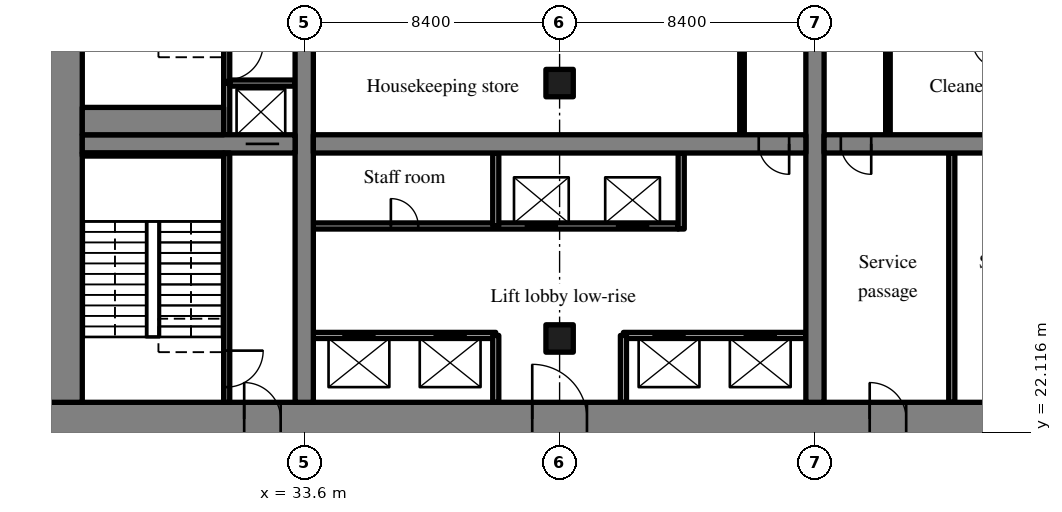
"""IFC4 building model, lengths in metres.
Left out: names, types, materials, properties, quantities, classifications, styles, units other than length and angle.
Written with IfcOpenShell. Run it as: python <this file> out.ifc"""

import sys

from ifc_helpers import new_model, si_unit, direction, frame, frame_2d, origin, origin_2d, place, context, subcontext, project, spatial, rectangle, extrude, source, transform, mapped, element, fill, save


model = new_model("IFC4")
c1 = context("Model", 3, precision=1e-05, world=origin(), true_north=direction((0.0, 1.0)))
c2 = subcontext(c1, "Body", "Model", "MODEL_VIEW")
j1 = project(units=[si_unit("LENGTHUNIT", "METRE"), si_unit("PLANEANGLEUNIT", "RADIAN")], contexts=[c1])
p1 = place(None, origin())
s1 = spatial("IfcSite", under=j1, at=p1, CompositionType="ELEMENT")
p2 = place(p1, origin())
s2 = spatial("IfcBuilding", under=s1, at=p2, CompositionType="ELEMENT")
p3 = place(p2, frame((0.0, 0.0, -13.5)))
s3 = spatial("IfcBuildingStorey", under=s2, at=p3, CompositionType="ELEMENT", Elevation=-13.5)
m1 = source(origin(), c2, "Body", "SweptSolid", [
    extrude(rectangle(XDim=50.4, YDim=1.1, at=frame_2d((25.2, 0.0))), origin(), (0.0, 0.0, 1.0), 4.52),
])
p4 = place(p3, frame((25.2, 22.55, -0.3), z_axis=(0.0, 0.0, 1.0), x_axis=(1.0, 0.0, 0.0)))
e1 = element("IfcWall", 1, at=p4, inside=s3, PredefinedType="SHEAR", context=c2, shape_type="MappedRepresentation", body=[
    mapped(m1, transform((0.0, 0.0, 0.0), scale=1.0)),
])
m2 = source(origin(), c2, "Body", "SweptSolid", [
    extrude(rectangle(XDim=1.8, YDim=2.1, at=frame_2d((0.9, 1.05))), frame((0.0, 0.56, 0.0), z_axis=(0.0, -1.0, 0.0), x_axis=(1.0, 0.0, 0.0)), (0.0, 0.0, 1.0), 1.12),
])
p5 = place(p4, frame((15.9, 0.0, 0.0)))
e2 = element("IfcOpeningElement", 2, at=p5, cuts=e1, PredefinedType="OPENING", context=c2, shape_type="MappedRepresentation", body=[
    mapped(m2, transform((0.0, 0.0, 0.0), scale=1.0)),
])
m3 = source(origin(), c2, "Body", "SweptSolid", [
    extrude(rectangle(XDim=1.2, YDim=2.1, at=frame_2d((0.6, 1.05))), frame((0.0, 0.56, 0.0), z_axis=(0.0, -1.0, 0.0), x_axis=(1.0, 0.0, 0.0)), (0.0, 0.0, 1.0), 1.12),
])
p6 = place(p4, frame((27.0, 0.0, 0.0)))
e3 = element("IfcOpeningElement", 3, at=p6, cuts=e1, PredefinedType="OPENING", context=c2, shape_type="MappedRepresentation", body=[
    mapped(m3, transform((0.0, 0.0, 0.0), scale=1.0)),
])
m4 = source(origin(), c2, "Body", "SweptSolid", [
    extrude(rectangle(XDim=0.9, YDim=2.1, at=frame_2d((0.45, 1.05))), frame((0.0, 0.56, 0.0), z_axis=(0.0, -1.0, 0.0), x_axis=(1.0, 0.0, 0.0)), (0.0, 0.0, 1.0), 1.12),
])
p7 = place(p4, frame((33.75, 0.0, 0.0)))
e4 = element("IfcOpeningElement", 4, at=p7, cuts=e1, PredefinedType="OPENING", context=c2, shape_type="MappedRepresentation", body=[
    mapped(m4, transform((0.0, 0.0, 0.0), scale=1.0)),
])
p8 = place(p4, frame((30.75, 0.0, 0.0)))
e5 = element("IfcOpeningElement", 5, at=p8, cuts=e1, PredefinedType="OPENING", context=c2, shape_type="MappedRepresentation", body=[
    mapped(m4, transform((0.0, 0.0, 0.0), scale=1.0)),
])
p9 = place(p4, frame((38.25, 0.0, 0.0)))
e6 = element("IfcOpeningElement", 6, at=p9, cuts=e1, PredefinedType="OPENING", context=c2, shape_type="MappedRepresentation", body=[
    mapped(m4, transform((0.0, 0.0, 0.0), scale=1.0)),
])
p10 = place(p4, frame((6.425, 0.0, 0.0)))
e7 = element("IfcOpeningElement", 7, at=p10, cuts=e1, PredefinedType="OPENING", context=c2, shape_type="MappedRepresentation", body=[
    mapped(m3, transform((0.0, 0.0, 0.0), scale=1.0)),
])
p11 = place(p4, frame((47.675, 0.0, 0.0)))
e8 = element("IfcOpeningElement", 8, at=p11, cuts=e1, PredefinedType="OPENING", context=c2, shape_type="MappedRepresentation", body=[
    mapped(m3, transform((0.0, 0.0, 0.0), scale=1.0)),
])
m5 = source(origin(), c2, "Body", "SweptSolid", [
    extrude(rectangle(XDim=17.8, YDim=1.1, at=frame_2d((8.9, 0.0))), origin(), (0.0, 0.0, 1.0), 4.52),
])
p12 = place(p3, frame((25.75, 23.1, -0.3), z_axis=(0.0, 0.0, 1.0), x_axis=(0.0, 1.0, 0.0)))
e9 = element("IfcWall", 9, at=p12, inside=s3, PredefinedType="SHEAR", context=c2, shape_type="MappedRepresentation", body=[
    mapped(m5, transform((0.0, 0.0, 0.0), scale=1.0)),
])
m6 = source(origin(), c2, "Body", "SweptSolid", [
    extrude(rectangle(XDim=17.8, YDim=0.6, at=frame_2d((8.9, 0.0))), origin(), (0.0, 0.0, 1.0), 4.52),
])
p13 = place(p3, frame((33.6, 23.1, -0.3), z_axis=(0.0, 0.0, 1.0), x_axis=(0.0, 1.0, 0.0)))
e10 = element("IfcWall", 10, at=p13, inside=s3, PredefinedType="SHEAR", context=c2, shape_type="MappedRepresentation", body=[
    mapped(m6, transform((0.0, 0.0, 0.0), scale=1.0)),
])
m7 = source(origin(), c2, "Body", "SweptSolid", [
    extrude(rectangle(XDim=1.1, YDim=2.1, at=frame_2d((0.55, 1.05))), frame((0.0, 0.31, 0.0), z_axis=(0.0, -1.0, 0.0), x_axis=(1.0, 0.0, 0.0)), (0.0, 0.0, 1.0), 0.62),
])
p14 = place(p13, frame((12.35, 0.0, 0.0)))
e11 = element("IfcOpeningElement", 11, at=p14, cuts=e10, PredefinedType="OPENING", context=c2, shape_type="MappedRepresentation", body=[
    mapped(m7, transform((0.0, 0.0, 0.0), scale=1.0)),
])
p15 = place(p3, frame((50.4, 23.1, -0.3), z_axis=(0.0, 0.0, 1.0), x_axis=(0.0, 1.0, 0.0)))
e12 = element("IfcWall", 12, at=p15, inside=s3, PredefinedType="SHEAR", context=c2, shape_type="MappedRepresentation", body=[
    mapped(m6, transform((0.0, 0.0, 0.0), scale=1.0)),
])
p16 = place(p15, frame((12.35, 0.0, 0.0)))
e13 = element("IfcOpeningElement", 13, at=p16, cuts=e12, PredefinedType="OPENING", context=c2, shape_type="MappedRepresentation", body=[
    mapped(m7, transform((0.0, 0.0, 0.0), scale=1.0)),
])
m8 = source(origin(), c2, "Body", "SweptSolid", [
    extrude(rectangle(XDim=7.0, YDim=0.6, at=frame_2d((3.5, 0.0))), origin(), (0.0, 0.0, 1.0), 4.52),
])
p17 = place(p3, frame((26.3, 31.6, -0.3), z_axis=(0.0, 0.0, 1.0), x_axis=(1.0, 0.0, 0.0)))
e14 = element("IfcWall", 14, at=p17, inside=s3, PredefinedType="SHEAR", context=c2, shape_type="MappedRepresentation", body=[
    mapped(m8, transform((0.0, 0.0, 0.0), scale=1.0)),
])
p18 = place(p17, frame((5.375, 0.0, 0.0)))
e15 = element("IfcOpeningElement", 15, at=p18, cuts=e14, PredefinedType="OPENING", context=c2, shape_type="MappedRepresentation", body=[
    mapped(m7, transform((0.0, 0.0, 0.0), scale=1.0)),
])
m9 = source(origin(), c2, "Body", "SweptSolid", [
    extrude(rectangle(XDim=16.2, YDim=0.6, at=frame_2d((8.1, 0.0))), origin(), (0.0, 0.0, 1.0), 4.52),
])
p19 = place(p3, frame((33.9, 31.6, -0.3), z_axis=(0.0, 0.0, 1.0), x_axis=(1.0, 0.0, 0.0)))
e16 = element("IfcWall", 16, at=p19, inside=s3, PredefinedType="SHEAR", context=c2, shape_type="MappedRepresentation", body=[
    mapped(m9, transform((0.0, 0.0, 0.0), scale=1.0)),
])
m10 = source(origin(), c2, "Body", "SweptSolid", [
    extrude(rectangle(XDim=1.0, YDim=2.1, at=frame_2d((0.5, 1.05))), frame((0.0, 0.31, 0.0), z_axis=(0.0, -1.0, 0.0), x_axis=(1.0, 0.0, 0.0)), (0.0, 0.0, 1.0), 0.62),
])
p20 = place(p19, frame((14.65, 0.0, 0.0)))
e17 = element("IfcOpeningElement", 17, at=p20, cuts=e16, PredefinedType="OPENING", context=c2, shape_type="MappedRepresentation", body=[
    mapped(m10, transform((0.0, 0.0, 0.0), scale=1.0)),
])
m11 = source(origin(), c2, "Body", "SweptSolid", [
    extrude(rectangle(XDim=16.2, YDim=0.6, at=frame_2d((8.1, 0.0))), origin(), (0.0, 0.0, 1.0), 4.52),
])
p21 = place(p3, frame((50.7, 31.6, -0.3), z_axis=(0.0, 0.0, 1.0), x_axis=(1.0, 0.0, 0.0)))
e18 = element("IfcWall", 18, at=p21, inside=s3, PredefinedType="SHEAR", context=c2, shape_type="MappedRepresentation", body=[
    mapped(m11, transform((0.0, 0.0, 0.0), scale=1.0)),
])
p22 = place(p21, frame((0.55, 0.0, 0.0)))
e19 = element("IfcOpeningElement", 19, at=p22, cuts=e18, PredefinedType="OPENING", context=c2, shape_type="MappedRepresentation", body=[
    mapped(m10, transform((0.0, 0.0, 0.0), scale=1.0)),
])
m12 = source(origin(), c2, "Body", "SweptSolid", [
    extrude(rectangle(XDim=0.9, YDim=0.9, at=origin_2d()), origin(), (0.0, 0.0, 1.0), 4.52),
])
for number, where, z_axis, x_axis in (
    (20, (42.0, 25.2, -0.3), (0.0, 0.0, 1.0), (1.0, 0.0, 0.0)),
    (21, (42.0, 33.6, -0.3), (0.0, 0.0, 1.0), (1.0, 0.0, 0.0)),
):
    element("IfcColumn", number, at=place(p3, frame(where, z_axis=z_axis, x_axis=x_axis)), inside=s3, PredefinedType="COLUMN", context=c2, shape_type="MappedRepresentation", body=[
        mapped(m12, transform((0.0, 0.0, 0.0), scale=1.0)),
    ])
m13 = source(origin(), c2, "Body", "SweptSolid", [
    extrude(rectangle(XDim=6.0, YDim=0.2, at=frame_2d((3.0, 0.0))), origin(), (0.0, 0.0, 1.0), 4.22),
])
p23 = place(p3, frame((33.9, 25.3, 0.0), z_axis=(0.0, 0.0, 1.0), x_axis=(1.0, 0.0, 0.0)))
e22 = element("IfcWall", 22, at=p23, inside=s3, PredefinedType="SOLIDWALL", context=c2, shape_type="MappedRepresentation", body=[
    mapped(m13, transform((0.0, 0.0, 0.0), scale=1.0)),
])
m14 = source(origin(), c2, "Body", "SweptSolid", [
    extrude(rectangle(XDim=1.1, YDim=2.1, at=frame_2d((0.55, 1.05))), frame((0.0, 0.11, 0.0), z_axis=(0.0, -1.0, 0.0), x_axis=(1.0, 0.0, 0.0)), (0.0, 0.0, 1.0), 0.22),
])
p24 = place(p23, frame((0.95, 0.0, 0.0)))
e23 = element("IfcOpeningElement", 23, at=p24, cuts=e22, PredefinedType="OPENING", context=c2, shape_type="MappedRepresentation", body=[
    mapped(m14, transform((0.0, 0.0, 0.0), scale=1.0)),
])
p25 = place(p23, frame((3.95, 0.0, 0.0)))
e24 = element("IfcOpeningElement", 24, at=p25, cuts=e22, PredefinedType="OPENING", context=c2, shape_type="MappedRepresentation", body=[
    mapped(m14, transform((0.0, 0.0, 0.0), scale=1.0)),
])
p26 = place(p3, frame((44.1, 25.3, 0.0), z_axis=(0.0, 0.0, 1.0), x_axis=(1.0, 0.0, 0.0)))
e25 = element("IfcWall", 25, at=p26, inside=s3, PredefinedType="SOLIDWALL", context=c2, shape_type="MappedRepresentation", body=[
    mapped(m13, transform((0.0, 0.0, 0.0), scale=1.0)),
])
p27 = place(p26, frame((0.95, 0.0, 0.0)))
e26 = element("IfcOpeningElement", 26, at=p27, cuts=e25, PredefinedType="OPENING", context=c2, shape_type="MappedRepresentation", body=[
    mapped(m14, transform((0.0, 0.0, 0.0), scale=1.0)),
])
p28 = place(p26, frame((3.95, 0.0, 0.0)))
e27 = element("IfcOpeningElement", 27, at=p28, cuts=e25, PredefinedType="OPENING", context=c2, shape_type="MappedRepresentation", body=[
    mapped(m14, transform((0.0, 0.0, 0.0), scale=1.0)),
])
m15 = source(origin(), c2, "Body", "SweptSolid", [
    extrude(rectangle(XDim=12.0, YDim=0.2, at=frame_2d((6.0, 0.0))), origin(), (0.0, 0.0, 1.0), 4.22),
])
p29 = place(p3, frame((33.9, 28.9, 0.0), z_axis=(0.0, 0.0, 1.0), x_axis=(1.0, 0.0, 0.0)))
e28 = element("IfcWall", 28, at=p29, inside=s3, PredefinedType="SOLIDWALL", context=c2, shape_type="MappedRepresentation", body=[
    mapped(m15, transform((0.0, 0.0, 0.0), scale=1.0)),
])
p30 = place(p29, frame((6.95, 0.0, 0.0)))
e29 = element("IfcOpeningElement", 29, at=p30, cuts=e28, PredefinedType="OPENING", context=c2, shape_type="MappedRepresentation", body=[
    mapped(m14, transform((0.0, 0.0, 0.0), scale=1.0)),
])
p31 = place(p29, frame((9.95, 0.0, 0.0)))
e30 = element("IfcOpeningElement", 30, at=p31, cuts=e28, PredefinedType="OPENING", context=c2, shape_type="MappedRepresentation", body=[
    mapped(m14, transform((0.0, 0.0, 0.0), scale=1.0)),
])
m16 = source(origin(), c2, "Body", "SweptSolid", [
    extrude(rectangle(XDim=0.9, YDim=2.1, at=frame_2d((0.45, 1.05))), frame((0.0, 0.11, 0.0), z_axis=(0.0, -1.0, 0.0), x_axis=(1.0, 0.0, 0.0)), (0.0, 0.0, 1.0), 0.22),
])
p32 = place(p29, frame((2.55, 0.0, 0.0)))
e31 = element("IfcOpeningElement", 31, at=p32, cuts=e28, PredefinedType="OPENING", context=c2, shape_type="MappedRepresentation", body=[
    mapped(m16, transform((0.0, 0.0, 0.0), scale=1.0)),
])
m17 = source(origin(), c2, "Body", "SweptSolid", [
    extrude(rectangle(XDim=2.2, YDim=0.2, at=frame_2d((1.1, 0.0))), origin(), (0.0, 0.0, 1.0), 4.22),
])
for number, where, z_axis, x_axis in (
    (32, (39.9, 23.1, 0.0), (0.0, 0.0, 1.0), (0.0, 1.0, 0.0)),
    (33, (44.1, 23.1, 0.0), (0.0, 0.0, 1.0), (0.0, 1.0, 0.0)),
):
    element("IfcWall", number, at=place(p3, frame(where, z_axis=z_axis, x_axis=x_axis)), inside=s3, PredefinedType="SOLIDWALL", context=c2, shape_type="MappedRepresentation", body=[
        mapped(m17, transform((0.0, 0.0, 0.0), scale=1.0)),
    ])
m18 = source(origin(), c2, "Body", "SweptSolid", [
    extrude(rectangle(XDim=2.5, YDim=0.2, at=frame_2d((1.25, 0.0))), origin(), (0.0, 0.0, 1.0), 4.22),
])
p33 = place(p3, frame((46.0, 28.8, 0.0), z_axis=(0.0, 0.0, 1.0), x_axis=(0.0, 1.0, 0.0)))
e34 = element("IfcWall", 34, at=p33, inside=s3, PredefinedType="SOLIDWALL", context=c2, shape_type="MappedRepresentation", body=[
    mapped(m18, transform((0.0, 0.0, 0.0), scale=1.0)),
])
m19 = source(origin(), c2, "Body", "SweptSolid", [
    extrude(rectangle(XDim=2.4, YDim=0.2, at=frame_2d((1.2, 0.0))), origin(), (0.0, 0.0, 1.0), 4.22),
])
p34 = place(p3, frame((39.9, 28.9, 0.0), z_axis=(0.0, 0.0, 1.0), x_axis=(0.0, 1.0, 0.0)))
e35 = element("IfcWall", 35, at=p34, inside=s3, PredefinedType="PARTITIONING", context=c2, shape_type="MappedRepresentation", body=[
    mapped(m19, transform((0.0, 0.0, 0.0), scale=1.0)),
])
m20 = source(origin(), c2, "Body", "SweptSolid", [
    extrude(rectangle(XDim=3.1, YDim=0.15, at=frame_2d((1.55, 0.0))), origin(), (0.0, 0.0, 1.0), 4.22),
])
p35 = place(p3, frame((48.0, 31.9, 0.0), z_axis=(0.0, 0.0, 1.0), x_axis=(0.0, 1.0, 0.0)))
e36 = element("IfcWall", 36, at=p35, inside=s3, PredefinedType="PARTITIONING", context=c2, shape_type="MappedRepresentation", body=[
    mapped(m20, transform((0.0, 0.0, 0.0), scale=1.0)),
])
m21 = source(origin(), c2, "Body", "SweptSolid", [
    extrude(rectangle(XDim=8.2, YDim=0.2, at=frame_2d((4.1, 0.0))), origin(), (0.0, 0.0, 1.0), 4.22),
])
p36 = place(p3, frame((54.9, 23.1, 0.0), z_axis=(0.0, 0.0, 1.0), x_axis=(0.0, 1.0, 0.0)))
e37 = element("IfcWall", 37, at=p36, inside=s3, PredefinedType="PARTITIONING", context=c2, shape_type="MappedRepresentation", body=[
    mapped(m21, transform((0.0, 0.0, 0.0), scale=1.0)),
])
p37 = place(p3, frame((52.8, 31.9, 0.0), z_axis=(0.0, 0.0, 1.0), x_axis=(0.0, 1.0, 0.0)))
e38 = element("IfcWall", 38, at=p37, inside=s3, PredefinedType="PARTITIONING", context=c2, shape_type="MappedRepresentation", body=[
    mapped(m20, transform((0.0, 0.0, 0.0), scale=1.0)),
])
m22 = source(origin(), c2, "Body", "SweptSolid", [
    extrude(rectangle(XDim=8.2, YDim=0.2, at=frame_2d((4.1, 0.0))), origin(), (0.0, 0.0, 1.0), 4.52),
])
p38 = place(p3, frame((31.05, 23.1, -0.3), z_axis=(0.0, 0.0, 1.0), x_axis=(0.0, 1.0, 0.0)))
e39 = element("IfcWall", 39, at=p38, inside=s3, PredefinedType="SOLIDWALL", context=c2, shape_type="MappedRepresentation", body=[
    mapped(m22, transform((0.0, 0.0, 0.0), scale=1.0)),
])
m23 = source(origin(), c2, "Body", "SweptSolid", [
    extrude(rectangle(XDim=1.2, YDim=2.1, at=frame_2d((0.6, 1.05))), frame((0.0, 0.11, 0.0), z_axis=(0.0, -1.0, 0.0), x_axis=(1.0, 0.0, 0.0)), (0.0, 0.0, 1.0), 0.22),
])
p39 = place(p38, frame((0.5, 0.0, 0.0)))
e40 = element("IfcOpeningElement", 40, at=p39, cuts=e39, PredefinedType="OPENING", context=c2, shape_type="MappedRepresentation", body=[
    mapped(m23, transform((0.0, 0.0, 0.0), scale=1.0)),
])
m24 = source(origin(), c2, "Body", "SweptSolid", [
    extrude(rectangle(XDim=1.7, YDim=0.2, at=frame_2d((0.85, 0.0))), origin(), (0.0, 0.0, 1.0), 4.22),
])
p40 = place(p3, frame((31.05, 31.9, 0.0), z_axis=(0.0, 0.0, 1.0), x_axis=(0.0, 1.0, 0.0)))
e41 = element("IfcWall", 41, at=p40, inside=s3, PredefinedType="SOLIDWALL", context=c2, shape_type="MappedRepresentation", body=[
    mapped(m24, transform((0.0, 0.0, 0.0), scale=1.0)),
])
m25 = source(origin(), c2, "Body", "SweptSolid", [
    extrude(rectangle(XDim=2.15, YDim=0.2, at=frame_2d((1.075, 0.0))), origin(), (0.0, 0.0, 1.0), 4.22),
])
p41 = place(p3, frame((31.15, 33.6, 0.0), z_axis=(0.0, 0.0, 1.0), x_axis=(1.0, 0.0, 0.0)))
e42 = element("IfcWall", 42, at=p41, inside=s3, PredefinedType="SOLIDWALL", context=c2, shape_type="MappedRepresentation", body=[
    mapped(m25, transform((0.0, 0.0, 0.0), scale=1.0)),
])
m26 = source(origin(), c2, "Body", "SweptSolid", [
    extrude(rectangle(XDim=7.3, YDim=0.2, at=frame_2d((3.65, 0.0))), origin(), (0.0, 0.0, 1.0), 4.52),
])
p42 = place(p3, frame((31.05, 33.6, -0.3), z_axis=(0.0, 0.0, 1.0), x_axis=(0.0, 1.0, 0.0)))
e43 = element("IfcWall", 43, at=p42, inside=s3, PredefinedType="SOLIDWALL", context=c2, shape_type="MappedRepresentation", body=[
    mapped(m26, transform((0.0, 0.0, 0.0), scale=1.0)),
])
p43 = place(p42, frame((0.1, 0.0, 0.0)))
e44 = element("IfcOpeningElement", 44, at=p43, cuts=e43, PredefinedType="OPENING", context=c2, shape_type="MappedRepresentation", body=[
    mapped(m23, transform((0.0, 0.0, 0.0), scale=1.0)),
])
m27 = source(origin(), c2, "Body", "SweptSolid", [
    extrude(rectangle(XDim=4.65, YDim=0.1, at=frame_2d((2.325, 0.0))), origin(), (0.0, 0.0, 1.0), 4.52),
])
p44 = place(p3, frame((26.3, 31.25, -0.3), z_axis=(0.0, 0.0, 1.0), x_axis=(1.0, 0.0, 0.0)))
e45 = element("IfcWall", 45, at=p44, inside=s3, PredefinedType="SOLIDWALL", context=c2, shape_type="MappedRepresentation", body=[
    mapped(m27, transform((0.0, 0.0, 0.0), scale=1.0)),
])
m28 = source(origin(), c2, "Body", "SweptSolid", [
    extrude(rectangle(XDim=4.65, YDim=0.9, at=frame_2d((2.325, 0.0))), origin(), (0.0, 0.0, 1.0), 4.52),
])
p45 = place(p3, frame((26.3, 32.35, -0.3), z_axis=(0.0, 0.0, 1.0), x_axis=(1.0, 0.0, 0.0)))
e46 = element("IfcWall", 46, at=p45, inside=s3, PredefinedType="SOLIDWALL", context=c2, shape_type="MappedRepresentation", body=[
    mapped(m28, transform((0.0, 0.0, 0.0), scale=1.0)),
])
m29 = source(origin(), c2, "Body", "SweptSolid", [
    extrude(rectangle(XDim=1.8, YDim=2.1, at=frame_2d((0.9, 1.05))), frame((0.0, 0.325, 0.0), z_axis=(0.0, -1.0, 0.0), x_axis=(1.0, 0.0, 0.0)), (0.0, 0.0, 1.0), 0.05),
])
p46 = place(p5, origin())
e47 = element("IfcDoor", 47, at=p46, inside=s3, OperationType="DOUBLE_DOOR_SINGLE_SWING", PredefinedType="DOOR", context=c2, shape_type="MappedRepresentation", body=[
    mapped(m29, transform((0.0, 0.0, 0.0), scale=1.0)),
])
fill(e2, e47)
m30 = source(origin(), c2, "Body", "SweptSolid", [
    extrude(rectangle(XDim=1.0, YDim=2.1, at=frame_2d((0.5, 1.05))), frame((0.0, 0.025, 0.0), z_axis=(0.0, -1.0, 0.0), x_axis=(1.0, 0.0, 0.0)), (0.0, 0.0, 1.0), 0.05),
])
p47 = place(p20, origin())
e48 = element("IfcDoor", 48, at=p47, inside=s3, OperationType="SINGLE_SWING_RIGHT", PredefinedType="DOOR", context=c2, shape_type="MappedRepresentation", body=[
    mapped(m30, transform((0.0, 0.0, 0.0), scale=1.0)),
])
fill(e17, e48)
m31 = source(origin(), c2, "Body", "SweptSolid", [
    extrude(rectangle(XDim=1.1, YDim=2.1, at=frame_2d((0.55, 1.05))), frame((0.0, 0.025, 0.0), z_axis=(0.0, -1.0, 0.0), x_axis=(1.0, 0.0, 0.0)), (0.0, 0.0, 1.0), 0.05),
])
p48 = place(p24, origin())
e49 = element("IfcDoor", 49, at=p48, inside=s3, OperationType="SLIDING_TO_LEFT", PredefinedType="DOOR", context=c2, shape_type="MappedRepresentation", body=[
    mapped(m31, transform((0.0, 0.0, 0.0), scale=1.0)),
])
fill(e23, e49)
p49 = place(p25, origin())
e50 = element("IfcDoor", 50, at=p49, inside=s3, OperationType="SLIDING_TO_RIGHT", PredefinedType="DOOR", context=c2, shape_type="MappedRepresentation", body=[
    mapped(m31, transform((0.0, 0.0, 0.0), scale=1.0)),
])
fill(e24, e50)
p50 = place(p27, origin())
e51 = element("IfcDoor", 51, at=p50, inside=s3, OperationType="SLIDING_TO_LEFT", PredefinedType="DOOR", context=c2, shape_type="MappedRepresentation", body=[
    mapped(m31, transform((0.0, 0.0, 0.0), scale=1.0)),
])
fill(e26, e51)
p51 = place(p28, origin())
e52 = element("IfcDoor", 52, at=p51, inside=s3, OperationType="SLIDING_TO_RIGHT", PredefinedType="DOOR", context=c2, shape_type="MappedRepresentation", body=[
    mapped(m31, transform((0.0, 0.0, 0.0), scale=1.0)),
])
fill(e27, e52)
p52 = place(p30, origin())
e53 = element("IfcDoor", 53, at=p52, inside=s3, OperationType="SLIDING_TO_LEFT", PredefinedType="DOOR", context=c2, shape_type="MappedRepresentation", body=[
    mapped(m31, transform((0.0, 0.0, 0.0), scale=1.0)),
])
fill(e29, e53)
p53 = place(p31, origin())
e54 = element("IfcDoor", 54, at=p53, inside=s3, OperationType="SLIDING_TO_RIGHT", PredefinedType="DOOR", context=c2, shape_type="MappedRepresentation", body=[
    mapped(m31, transform((0.0, 0.0, 0.0), scale=1.0)),
])
fill(e30, e54)
m32 = source(origin(), c2, "Body", "SweptSolid", [
    extrude(rectangle(XDim=0.9, YDim=2.1, at=frame_2d((0.45, 1.05))), frame((0.0, 0.025, 0.0), z_axis=(0.0, -1.0, 0.0), x_axis=(1.0, 0.0, 0.0)), (0.0, 0.0, 1.0), 0.05),
])
p54 = place(p32, origin())
e55 = element("IfcDoor", 55, at=p54, inside=s3, OperationType="SINGLE_SWING_LEFT", PredefinedType="DOOR", context=c2, shape_type="MappedRepresentation", body=[
    mapped(m32, transform((0.0, 0.0, 0.0), scale=1.0)),
])
fill(e31, e55)
m33 = source(origin(), c2, "Body", "SweptSolid", [
    extrude(rectangle(XDim=1.2, YDim=2.1, at=frame_2d((0.6, 1.05))), frame((0.0, 0.325, 0.0), z_axis=(0.0, -1.0, 0.0), x_axis=(1.0, 0.0, 0.0)), (0.0, 0.0, 1.0), 0.05),
])
p55 = place(p6, origin())
e56 = element("IfcDoor", 56, at=p55, inside=s3, OperationType="SINGLE_SWING_LEFT", PredefinedType="DOOR", context=c2, shape_type="MappedRepresentation", body=[
    mapped(m33, transform((0.0, 0.0, 0.0), scale=1.0)),
])
fill(e3, e56)
p56 = place(p22, origin())
e57 = element("IfcDoor", 57, at=p56, inside=s3, OperationType="SINGLE_SWING_RIGHT", PredefinedType="DOOR", context=c2, shape_type="MappedRepresentation", body=[
    mapped(m30, transform((0.0, 0.0, 0.0), scale=1.0)),
])
fill(e19, e57)
m34 = source(origin(), c2, "Body", "SweptSolid", [
    extrude(rectangle(XDim=1.2, YDim=2.1, at=frame_2d((0.6, 1.05))), frame((0.0, 0.025, 0.0), z_axis=(0.0, -1.0, 0.0), x_axis=(1.0, 0.0, 0.0)), (0.0, 0.0, 1.0), 0.05),
])
p57 = place(p39, origin())
e58 = element("IfcDoor", 58, at=p57, inside=s3, OperationType="SINGLE_SWING_RIGHT", PredefinedType="DOOR", context=c2, shape_type="MappedRepresentation", body=[
    mapped(m34, transform((0.0, 0.0, 0.0), scale=1.0)),
])
fill(e40, e58)
p58 = place(p10, origin())
e59 = element("IfcDoor", 59, at=p58, inside=s3, OperationType="SINGLE_SWING_LEFT", PredefinedType="DOOR", context=c2, shape_type="MappedRepresentation", body=[
    mapped(m33, transform((0.0, 0.0, 0.0), scale=1.0)),
])
fill(e7, e59)
p59 = place(p18, origin())
e60 = element("IfcDoor", 60, at=p59, inside=s3, OperationType="SLIDING_TO_RIGHT", PredefinedType="DOOR", context=c2, shape_type="MappedRepresentation", body=[
    mapped(m31, transform((0.0, 0.0, 0.0), scale=1.0)),
])
fill(e15, e60)
p60 = place(p43, origin())
e61 = element("IfcDoor", 61, at=p60, inside=s3, OperationType="SINGLE_SWING_RIGHT", PredefinedType="DOOR", context=c2, shape_type="MappedRepresentation", body=[
    mapped(m34, transform((0.0, 0.0, 0.0), scale=1.0)),
])
fill(e44, e61)
save(model, sys.argv[1])
